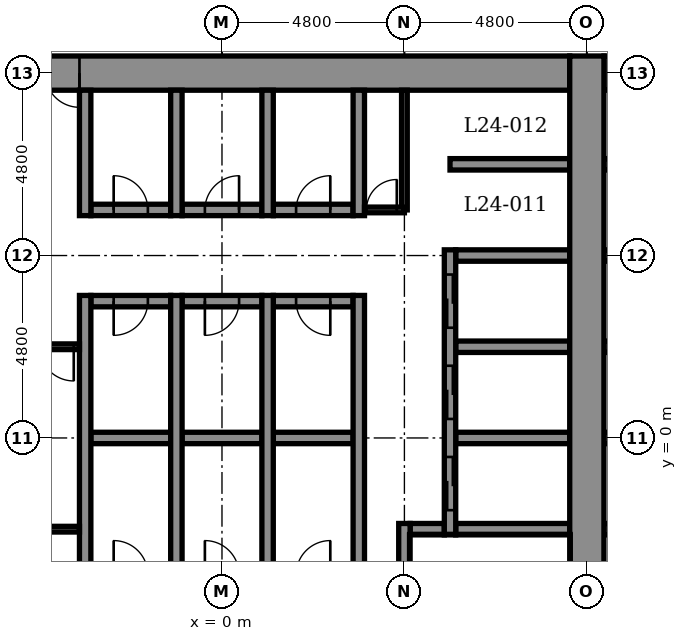
"""IFC4 building model, lengths in metres.
Left out: names, types, materials, properties, quantities, classifications, styles, units other than length and angle.
Written with IfcOpenShell. Run it as: python <this file> out.ifc"""

import sys

from ifc_helpers import new_model, si_unit, direction, frame, frame_2d, origin, place, context, subcontext, project, spatial, rectangle, extrude, element, fill, save


model = new_model("IFC4")
c1 = context("Model", 3, precision=1e-05, world=origin(), true_north=direction((0.0, 1.0)))
c2 = subcontext(c1, "Body", "Model", "MODEL_VIEW")
j1 = project(units=[si_unit("LENGTHUNIT", "METRE"), si_unit("PLANEANGLEUNIT", "RADIAN")], contexts=[c1])
p1 = place(None, origin())
s1 = spatial("IfcSite", under=j1, at=p1, CompositionType="ELEMENT")
p2 = place(p1, origin())
s2 = spatial("IfcBuilding", under=s1, at=p2, CompositionType="ELEMENT")
p3 = place(p2, frame((0.0, 0.0, 122.9)))
s3 = spatial("IfcBuildingStorey", under=s2, at=p3, CompositionType="ELEMENT", Elevation=122.9)
p4 = place(p3, frame((4.95, -2.4, -0.2), z_axis=(0.0, 0.0, 1.0), x_axis=(1.0, 0.0, 0.0)))
e1 = element("IfcWall", 1, at=p4, inside=s3, PredefinedType="STANDARD", context=c2, shape_type="SweptSolid", body=[
    extrude(rectangle(XDim=0.9, YDim=0.3, at=frame_2d((0.45, 0.0))), origin(), (0.0, 0.0, 1.0), 4.4),
])
p5 = place(p3, frame((6.15, -2.4, -0.2), z_axis=(0.0, 0.0, 1.0), x_axis=(1.0, 0.0, 0.0)))
e2 = element("IfcWall", 2, at=p5, inside=s3, PredefinedType="STANDARD", context=c2, shape_type="SweptSolid", body=[
    extrude(rectangle(XDim=3.0, YDim=0.3, at=frame_2d((1.5, 0.0))), origin(), (0.0, 0.0, 1.0), 4.4),
])
p6 = place(p3, frame((10.05, -2.4, -0.2), z_axis=(0.0, 0.0, 1.0), x_axis=(1.0, 0.0, 0.0)))
e3 = element("IfcWall", 3, at=p6, inside=s3, PredefinedType="STANDARD", context=c2, shape_type="SweptSolid", body=[
    extrude(rectangle(XDim=3.9, YDim=0.3, at=frame_2d((1.95, 0.0))), origin(), (0.0, 0.0, 1.0), 4.4),
])
p7 = place(p3, frame((-3.45, 0.0, -0.2), z_axis=(0.0, 0.0, 1.0), x_axis=(1.0, 0.0, 0.0)))
e4 = element("IfcWall", 4, at=p7, inside=s3, PredefinedType="STANDARD", context=c2, shape_type="SweptSolid", body=[
    extrude(rectangle(XDim=2.1, YDim=0.3, at=frame_2d((1.05, 0.0))), origin(), (0.0, 0.0, 1.0), 4.4),
])
p8 = place(p3, frame((-1.05, 0.0, -0.2), z_axis=(0.0, 0.0, 1.0), x_axis=(1.0, 0.0, 0.0)))
e5 = element("IfcWall", 5, at=p8, inside=s3, PredefinedType="STANDARD", context=c2, shape_type="SweptSolid", body=[
    extrude(rectangle(XDim=2.1, YDim=0.3, at=frame_2d((1.05, 0.0))), origin(), (0.0, 0.0, 1.0), 4.4),
])
p9 = place(p3, frame((1.35, 0.0, -0.2), z_axis=(0.0, 0.0, 1.0), x_axis=(1.0, 0.0, 0.0)))
e6 = element("IfcWall", 6, at=p9, inside=s3, PredefinedType="STANDARD", context=c2, shape_type="SweptSolid", body=[
    extrude(rectangle(XDim=2.1, YDim=0.3, at=frame_2d((1.05, 0.0))), origin(), (0.0, 0.0, 1.0), 4.4),
])
p10 = place(p3, frame((6.15, 0.0, -0.2), z_axis=(0.0, 0.0, 1.0), x_axis=(1.0, 0.0, 0.0)))
e7 = element("IfcWall", 7, at=p10, inside=s3, PredefinedType="STANDARD", context=c2, shape_type="SweptSolid", body=[
    extrude(rectangle(XDim=3.0, YDim=0.3, at=frame_2d((1.5, 0.0))), origin(), (0.0, 0.0, 1.0), 4.4),
])
p11 = place(p3, frame((10.05, 0.0, -0.2), z_axis=(0.0, 0.0, 1.0), x_axis=(1.0, 0.0, 0.0)))
e8 = element("IfcWall", 8, at=p11, inside=s3, PredefinedType="STANDARD", context=c2, shape_type="SweptSolid", body=[
    extrude(rectangle(XDim=3.9, YDim=0.3, at=frame_2d((1.95, 0.0))), origin(), (0.0, 0.0, 1.0), 4.4),
])
p12 = place(p3, frame((6.15, 2.4, -0.2), z_axis=(0.0, 0.0, 1.0), x_axis=(1.0, 0.0, 0.0)))
e9 = element("IfcWall", 9, at=p12, inside=s3, PredefinedType="STANDARD", context=c2, shape_type="SweptSolid", body=[
    extrude(rectangle(XDim=3.0, YDim=0.3, at=frame_2d((1.5, 0.0))), origin(), (0.0, 0.0, 1.0), 4.4),
])
p13 = place(p3, frame((10.05, 2.4, -0.2), z_axis=(0.0, 0.0, 1.0), x_axis=(1.0, 0.0, 0.0)))
e10 = element("IfcWall", 10, at=p13, inside=s3, PredefinedType="STANDARD", context=c2, shape_type="SweptSolid", body=[
    extrude(rectangle(XDim=3.9, YDim=0.3, at=frame_2d((1.95, 0.0))), origin(), (0.0, 0.0, 1.0), 4.4),
])
p14 = place(p3, frame((-3.45, 3.6, -0.2), z_axis=(0.0, 0.0, 1.0), x_axis=(1.0, 0.0, 0.0)))
e11 = element("IfcWall", 11, at=p14, inside=s3, PredefinedType="STANDARD", context=c2, shape_type="SweptSolid", body=[
    extrude(rectangle(XDim=2.1, YDim=0.3, at=frame_2d((1.05, 0.0))), origin(), (0.0, 0.0, 1.0), 4.4),
])
p15 = place(p14, frame((0.6, 0.0, 0.2)))
e12 = element("IfcOpeningElement", 12, at=p15, cuts=e11, PredefinedType="OPENING", context=c2, shape_type="SweptSolid", body=[
    extrude(rectangle(XDim=0.9, YDim=2.1, at=frame_2d((0.45, 1.05))), frame((0.0, 0.16, 0.0), z_axis=(0.0, -1.0, 0.0), x_axis=(1.0, 0.0, 0.0)), (0.0, 0.0, 1.0), 0.32),
])
p16 = place(p3, frame((-1.05, 3.6, -0.2), z_axis=(0.0, 0.0, 1.0), x_axis=(1.0, 0.0, 0.0)))
e13 = element("IfcWall", 13, at=p16, inside=s3, PredefinedType="STANDARD", context=c2, shape_type="SweptSolid", body=[
    extrude(rectangle(XDim=2.1, YDim=0.3, at=frame_2d((1.05, 0.0))), origin(), (0.0, 0.0, 1.0), 4.4),
])
p17 = place(p16, frame((0.6, 0.0, 0.2)))
e14 = element("IfcOpeningElement", 14, at=p17, cuts=e13, PredefinedType="OPENING", context=c2, shape_type="SweptSolid", body=[
    extrude(rectangle(XDim=0.9, YDim=2.1, at=frame_2d((0.45, 1.05))), frame((0.0, 0.16, 0.0), z_axis=(0.0, -1.0, 0.0), x_axis=(1.0, 0.0, 0.0)), (0.0, 0.0, 1.0), 0.32),
])
p18 = place(p3, frame((1.35, 3.6, -0.2), z_axis=(0.0, 0.0, 1.0), x_axis=(1.0, 0.0, 0.0)))
e15 = element("IfcWall", 15, at=p18, inside=s3, PredefinedType="STANDARD", context=c2, shape_type="SweptSolid", body=[
    extrude(rectangle(XDim=2.1, YDim=0.3, at=frame_2d((1.05, 0.0))), origin(), (0.0, 0.0, 1.0), 4.4),
])
p19 = place(p18, frame((0.6, 0.0, 0.2)))
e16 = element("IfcOpeningElement", 16, at=p19, cuts=e15, PredefinedType="OPENING", context=c2, shape_type="SweptSolid", body=[
    extrude(rectangle(XDim=0.9, YDim=2.1, at=frame_2d((0.45, 1.05))), frame((0.0, 0.16, 0.0), z_axis=(0.0, -1.0, 0.0), x_axis=(1.0, 0.0, 0.0)), (0.0, 0.0, 1.0), 0.32),
])
p20 = place(p3, frame((6.15, 4.8, -0.2), z_axis=(0.0, 0.0, 1.0), x_axis=(1.0, 0.0, 0.0)))
e17 = element("IfcWall", 17, at=p20, inside=s3, PredefinedType="STANDARD", context=c2, shape_type="SweptSolid", body=[
    extrude(rectangle(XDim=3.0, YDim=0.3, at=frame_2d((1.5, 0.0))), origin(), (0.0, 0.0, 1.0), 4.4),
])
p21 = place(p3, frame((10.05, 4.8, -0.2), z_axis=(0.0, 0.0, 1.0), x_axis=(1.0, 0.0, 0.0)))
e18 = element("IfcWall", 18, at=p21, inside=s3, PredefinedType="STANDARD", context=c2, shape_type="SweptSolid", body=[
    extrude(rectangle(XDim=3.9, YDim=0.3, at=frame_2d((1.95, 0.0))), origin(), (0.0, 0.0, 1.0), 4.4),
])
p22 = place(p3, frame((-3.45, 6.0, -0.2), z_axis=(0.0, 0.0, 1.0), x_axis=(1.0, 0.0, 0.0)))
e19 = element("IfcWall", 19, at=p22, inside=s3, PredefinedType="STANDARD", context=c2, shape_type="SweptSolid", body=[
    extrude(rectangle(XDim=2.1, YDim=0.3, at=frame_2d((1.05, 0.0))), origin(), (0.0, 0.0, 1.0), 4.4),
])
p23 = place(p22, frame((0.6, 0.0, 0.2)))
e20 = element("IfcOpeningElement", 20, at=p23, cuts=e19, PredefinedType="OPENING", context=c2, shape_type="SweptSolid", body=[
    extrude(rectangle(XDim=0.9, YDim=2.1, at=frame_2d((0.45, 1.05))), frame((0.0, 0.16, 0.0), z_axis=(0.0, -1.0, 0.0), x_axis=(1.0, 0.0, 0.0)), (0.0, 0.0, 1.0), 0.32),
])
p24 = place(p3, frame((-1.05, 6.0, -0.2), z_axis=(0.0, 0.0, 1.0), x_axis=(1.0, 0.0, 0.0)))
e21 = element("IfcWall", 21, at=p24, inside=s3, PredefinedType="STANDARD", context=c2, shape_type="SweptSolid", body=[
    extrude(rectangle(XDim=2.1, YDim=0.3, at=frame_2d((1.05, 0.0))), origin(), (0.0, 0.0, 1.0), 4.4),
])
p25 = place(p24, frame((0.6, 0.0, 0.2)))
e22 = element("IfcOpeningElement", 22, at=p25, cuts=e21, PredefinedType="OPENING", context=c2, shape_type="SweptSolid", body=[
    extrude(rectangle(XDim=0.9, YDim=2.1, at=frame_2d((0.45, 1.05))), frame((0.0, 0.16, 0.0), z_axis=(0.0, -1.0, 0.0), x_axis=(1.0, 0.0, 0.0)), (0.0, 0.0, 1.0), 0.32),
])
p26 = place(p3, frame((1.35, 6.0, -0.2), z_axis=(0.0, 0.0, 1.0), x_axis=(1.0, 0.0, 0.0)))
e23 = element("IfcWall", 23, at=p26, inside=s3, PredefinedType="STANDARD", context=c2, shape_type="SweptSolid", body=[
    extrude(rectangle(XDim=2.1, YDim=0.3, at=frame_2d((1.05, 0.0))), origin(), (0.0, 0.0, 1.0), 4.4),
])
p27 = place(p26, frame((0.6, 0.0, 0.2)))
e24 = element("IfcOpeningElement", 24, at=p27, cuts=e23, PredefinedType="OPENING", context=c2, shape_type="SweptSolid", body=[
    extrude(rectangle(XDim=0.9, YDim=2.1, at=frame_2d((0.45, 1.05))), frame((0.0, 0.16, 0.0), z_axis=(0.0, -1.0, 0.0), x_axis=(1.0, 0.0, 0.0)), (0.0, 0.0, 1.0), 0.32),
])
p28 = place(p3, frame((6.0, 7.2, -0.2), z_axis=(0.0, 0.0, 1.0), x_axis=(1.0, 0.0, 0.0)))
e25 = element("IfcWall", 25, at=p28, inside=s3, PredefinedType="STANDARD", context=c2, shape_type="SweptSolid", body=[
    extrude(rectangle(XDim=3.15, YDim=0.3, at=frame_2d((1.575, 0.0))), origin(), (0.0, 0.0, 1.0), 4.4),
])
p29 = place(p3, frame((10.05, 7.2, -0.2), z_axis=(0.0, 0.0, 1.0), x_axis=(1.0, 0.0, 0.0)))
e26 = element("IfcWall", 26, at=p29, inside=s3, PredefinedType="STANDARD", context=c2, shape_type="SweptSolid", body=[
    extrude(rectangle(XDim=3.9, YDim=0.3, at=frame_2d((1.95, 0.0))), origin(), (0.0, 0.0, 1.0), 4.4),
])
p30 = place(p3, frame((-5.25, 9.6, -0.2), z_axis=(0.0, 0.0, 1.0), x_axis=(1.0, 0.0, 0.0)))
e27 = element("IfcWall", 27, at=p30, inside=s3, PredefinedType="SHEAR", context=c2, shape_type="SweptSolid", body=[
    extrude(rectangle(XDim=14.4, YDim=0.9, at=frame_2d((7.2, 0.0))), origin(), (0.0, 0.0, 1.0), 4.4),
])
p31 = place(p30, frame((0.6, 0.0, 0.2)))
e28 = element("IfcOpeningElement", 28, at=p31, cuts=e27, PredefinedType="OPENING", context=c2, shape_type="SweptSolid", body=[
    extrude(rectangle(XDim=0.9, YDim=2.1, at=frame_2d((0.45, 1.05))), frame((0.0, 0.46, 0.0), z_axis=(0.0, -1.0, 0.0), x_axis=(1.0, 0.0, 0.0)), (0.0, 0.0, 1.0), 0.92),
])
p32 = place(p3, frame((10.05, 9.6, -0.2), z_axis=(0.0, 0.0, 1.0), x_axis=(1.0, 0.0, 0.0)))
e29 = element("IfcWall", 29, at=p32, inside=s3, PredefinedType="SHEAR", context=c2, shape_type="SweptSolid", body=[
    extrude(rectangle(XDim=3.9, YDim=0.9, at=frame_2d((1.95, 0.0))), origin(), (0.0, 0.0, 1.0), 4.4),
])
p33 = place(p32, frame((0.7, 0.0, 0.2)))
e30 = element("IfcOpeningElement", 30, at=p33, cuts=e29, PredefinedType="OPENING", context=c2, shape_type="SweptSolid", body=[
    extrude(rectangle(XDim=0.9, YDim=2.1, at=frame_2d((0.45, 1.05))), frame((0.0, 0.46, 0.0), z_axis=(0.0, -1.0, 0.0), x_axis=(1.0, 0.0, 0.0)), (0.0, 0.0, 1.0), 0.92),
])
p34 = place(p32, frame((2.95, 0.0, 0.2)))
e31 = element("IfcOpeningElement", 31, at=p34, cuts=e29, PredefinedType="OPENING", context=c2, shape_type="SweptSolid", body=[
    extrude(rectangle(XDim=0.9, YDim=2.1, at=frame_2d((0.45, 1.05))), frame((0.0, 0.46, 0.0), z_axis=(0.0, -1.0, 0.0), x_axis=(1.0, 0.0, 0.0)), (0.0, 0.0, 1.0), 0.92),
])
p35 = place(p3, frame((-3.6, -3.75, -0.2), z_axis=(0.0, 0.0, 1.0), x_axis=(0.0, 1.0, 0.0)))
e32 = element("IfcWall", 32, at=p35, inside=s3, PredefinedType="STANDARD", context=c2, shape_type="SweptSolid", body=[
    extrude(rectangle(XDim=7.5, YDim=0.3, at=frame_2d((3.75, 0.0))), origin(), (0.0, 0.0, 1.0), 4.4),
])
p36 = place(p3, frame((-3.6, 5.85, -0.2), z_axis=(0.0, 0.0, 1.0), x_axis=(0.0, 1.0, 0.0)))
e33 = element("IfcWall", 33, at=p36, inside=s3, PredefinedType="STANDARD", context=c2, shape_type="SweptSolid", body=[
    extrude(rectangle(XDim=3.3, YDim=0.3, at=frame_2d((1.65, 0.0))), origin(), (0.0, 0.0, 1.0), 4.4),
])
p37 = place(p3, frame((-1.2, -3.75, -0.2), z_axis=(0.0, 0.0, 1.0), x_axis=(0.0, 1.0, 0.0)))
e34 = element("IfcWall", 34, at=p37, inside=s3, PredefinedType="STANDARD", context=c2, shape_type="SweptSolid", body=[
    extrude(rectangle(XDim=7.5, YDim=0.3, at=frame_2d((3.75, 0.0))), origin(), (0.0, 0.0, 1.0), 4.4),
])
p38 = place(p3, frame((-1.2, 5.85, -0.2), z_axis=(0.0, 0.0, 1.0), x_axis=(0.0, 1.0, 0.0)))
e35 = element("IfcWall", 35, at=p38, inside=s3, PredefinedType="STANDARD", context=c2, shape_type="SweptSolid", body=[
    extrude(rectangle(XDim=3.3, YDim=0.3, at=frame_2d((1.65, 0.0))), origin(), (0.0, 0.0, 1.0), 4.4),
])
p39 = place(p3, frame((1.2, -3.75, -0.2), z_axis=(0.0, 0.0, 1.0), x_axis=(0.0, 1.0, 0.0)))
e36 = element("IfcWall", 36, at=p39, inside=s3, PredefinedType="STANDARD", context=c2, shape_type="SweptSolid", body=[
    extrude(rectangle(XDim=7.5, YDim=0.3, at=frame_2d((3.75, 0.0))), origin(), (0.0, 0.0, 1.0), 4.4),
])
p40 = place(p3, frame((1.2, 5.85, -0.2), z_axis=(0.0, 0.0, 1.0), x_axis=(0.0, 1.0, 0.0)))
e37 = element("IfcWall", 37, at=p40, inside=s3, PredefinedType="STANDARD", context=c2, shape_type="SweptSolid", body=[
    extrude(rectangle(XDim=3.3, YDim=0.3, at=frame_2d((1.65, 0.0))), origin(), (0.0, 0.0, 1.0), 4.4),
])
p41 = place(p3, frame((3.6, -3.75, -0.2), z_axis=(0.0, 0.0, 1.0), x_axis=(0.0, 1.0, 0.0)))
e38 = element("IfcWall", 38, at=p41, inside=s3, PredefinedType="STANDARD", context=c2, shape_type="SweptSolid", body=[
    extrude(rectangle(XDim=7.5, YDim=0.3, at=frame_2d((3.75, 0.0))), origin(), (0.0, 0.0, 1.0), 4.4),
])
p42 = place(p3, frame((3.6, 5.85, -0.2), z_axis=(0.0, 0.0, 1.0), x_axis=(0.0, 1.0, 0.0)))
e39 = element("IfcWall", 39, at=p42, inside=s3, PredefinedType="STANDARD", context=c2, shape_type="SweptSolid", body=[
    extrude(rectangle(XDim=3.3, YDim=0.3, at=frame_2d((1.65, 0.0))), origin(), (0.0, 0.0, 1.0), 4.4),
])
p43 = place(p3, frame((4.8, -9.15, -0.2), z_axis=(0.0, 0.0, 1.0), x_axis=(0.0, 1.0, 0.0)))
e40 = element("IfcWall", 40, at=p43, inside=s3, PredefinedType="STANDARD", context=c2, shape_type="SweptSolid", body=[
    extrude(rectangle(XDim=6.9, YDim=0.3, at=frame_2d((3.45, 0.0))), origin(), (0.0, 0.0, 1.0), 4.4),
])
p44 = place(p43, frame((3.7, 0.0, 0.2)))
e41 = element("IfcOpeningElement", 41, at=p44, cuts=e40, PredefinedType="OPENING", context=c2, shape_type="SweptSolid", body=[
    extrude(rectangle(XDim=1.2, YDim=2.1, at=frame_2d((0.6, 1.05))), frame((0.0, 0.16, 0.0), z_axis=(0.0, -1.0, 0.0), x_axis=(1.0, 0.0, 0.0)), (0.0, 0.0, 1.0), 0.32),
])
p45 = place(p3, frame((6.0, -2.55, -0.2), z_axis=(0.0, 0.0, 1.0), x_axis=(0.0, 1.0, 0.0)))
e42 = element("IfcWall", 42, at=p45, inside=s3, PredefinedType="STANDARD", context=c2, shape_type="SweptSolid", body=[
    extrude(rectangle(XDim=7.5, YDim=0.3, at=frame_2d((3.75, 0.0))), origin(), (0.0, 0.0, 1.0), 4.4),
])
p46 = place(p45, frame((0.65, 0.0, 0.2)))
e43 = element("IfcOpeningElement", 43, at=p46, cuts=e42, PredefinedType="OPENING", context=c2, shape_type="SweptSolid", body=[
    extrude(rectangle(XDim=1.4, YDim=2.1, at=frame_2d((0.7, 1.05))), frame((0.0, 0.16, 0.0), z_axis=(0.0, -1.0, 0.0), x_axis=(1.0, 0.0, 0.0)), (0.0, 0.0, 1.0), 0.32),
])
p47 = place(p45, frame((3.05, 0.0, 0.2)))
e44 = element("IfcOpeningElement", 44, at=p47, cuts=e42, PredefinedType="OPENING", context=c2, shape_type="SweptSolid", body=[
    extrude(rectangle(XDim=1.4, YDim=2.1, at=frame_2d((0.7, 1.05))), frame((0.0, 0.16, 0.0), z_axis=(0.0, -1.0, 0.0), x_axis=(1.0, 0.0, 0.0)), (0.0, 0.0, 1.0), 0.32),
])
p48 = place(p45, frame((5.45, 0.0, 0.2)))
e45 = element("IfcOpeningElement", 45, at=p48, cuts=e42, PredefinedType="OPENING", context=c2, shape_type="SweptSolid", body=[
    extrude(rectangle(XDim=1.4, YDim=2.1, at=frame_2d((0.7, 1.05))), frame((0.0, 0.16, 0.0), z_axis=(0.0, -1.0, 0.0), x_axis=(1.0, 0.0, 0.0)), (0.0, 0.0, 1.0), 0.32),
])
p49 = place(p3, frame((9.6, -10.15, -0.2), z_axis=(0.0, 0.0, 1.0), x_axis=(0.0, 1.0, 0.0)))
e46 = element("IfcWall", 46, at=p49, inside=s3, PredefinedType="SHEAR", context=c2, shape_type="SweptSolid", body=[
    extrude(rectangle(XDim=20.2, YDim=0.9, at=frame_2d((10.1, 0.0))), origin(), (0.0, 0.0, 1.0), 4.4),
])
p50 = place(p3, frame((4.8, 6.0, 0.0), z_axis=(0.0, 0.0, 1.0), x_axis=(0.0, 1.0, 0.0)))
e47 = element("IfcWall", 47, at=p50, inside=s3, PredefinedType="PARTITIONING", context=c2, shape_type="SweptSolid", body=[
    extrude(rectangle(XDim=3.15, YDim=0.15, at=frame_2d((1.575, 0.0))), origin(), (0.0, 0.0, 1.0), 4.2),
])
p51 = place(p3, frame((3.75, 6.0, 0.0), z_axis=(0.0, 0.0, 1.0), x_axis=(1.0, 0.0, 0.0)))
e48 = element("IfcWall", 48, at=p51, inside=s3, PredefinedType="PARTITIONING", context=c2, shape_type="SweptSolid", body=[
    extrude(rectangle(XDim=1.05, YDim=0.15, at=frame_2d((0.525, 0.0))), origin(), (0.0, 0.0, 1.0), 4.2),
])
p52 = place(p51, frame((0.05, 0.0, 0.0)))
e49 = element("IfcOpeningElement", 49, at=p52, cuts=e48, PredefinedType="OPENING", context=c2, shape_type="SweptSolid", body=[
    extrude(rectangle(XDim=0.8, YDim=2.1, at=frame_2d((0.4, 1.05))), frame((0.0, 0.085, 0.0), z_axis=(0.0, -1.0, 0.0), x_axis=(1.0, 0.0, 0.0)), (0.0, 0.0, 1.0), 0.17),
])
p53 = place(p3, frame((-4.95, 2.4, 0.0), z_axis=(0.0, 0.0, 1.0), x_axis=(1.0, 0.0, 0.0)))
e50 = element("IfcWall", 50, at=p53, inside=s3, PredefinedType="PARTITIONING", context=c2, shape_type="SweptSolid", body=[
    extrude(rectangle(XDim=1.2, YDim=0.15, at=frame_2d((0.6, 0.0))), origin(), (0.0, 0.0, 1.0), 4.2),
])
p54 = place(p53, frame((0.15, 0.0, 0.0)))
e51 = element("IfcOpeningElement", 51, at=p54, cuts=e50, PredefinedType="OPENING", context=c2, shape_type="SweptSolid", body=[
    extrude(rectangle(XDim=0.9, YDim=2.1, at=frame_2d((0.45, 1.05))), frame((0.0, 0.085, 0.0), z_axis=(0.0, -1.0, 0.0), x_axis=(1.0, 0.0, 0.0)), (0.0, 0.0, 1.0), 0.17),
])
p55 = place(p3, frame((-4.95, -2.4, 0.0), z_axis=(0.0, 0.0, 1.0), x_axis=(1.0, 0.0, 0.0)))
e52 = element("IfcWall", 52, at=p55, inside=s3, PredefinedType="PARTITIONING", context=c2, shape_type="SweptSolid", body=[
    extrude(rectangle(XDim=1.2, YDim=0.15, at=frame_2d((0.6, 0.0))), origin(), (0.0, 0.0, 1.0), 4.2),
])
p56 = place(p52, origin())
e53 = element("IfcDoor", 53, at=p56, inside=s3, OperationType="SINGLE_SWING_RIGHT", PredefinedType="DOOR", context=c2, shape_type="SweptSolid", body=[
    extrude(rectangle(XDim=0.8, YDim=2.1, at=frame_2d((0.4, 1.05))), frame((0.0, 0.025, 0.0), z_axis=(0.0, -1.0, 0.0), x_axis=(1.0, 0.0, 0.0)), (0.0, 0.0, 1.0), 0.05),
])
fill(e49, e53)
p57 = place(p46, origin())
e54 = element("IfcDoor", 54, at=p57, inside=s3, OperationType="DOUBLE_DOOR_SLIDING", PredefinedType="DOOR", context=c2, shape_type="SweptSolid", body=[
    extrude(rectangle(XDim=1.4, YDim=2.1, at=frame_2d((0.7, 1.05))), frame((0.0, 0.025, 0.0), z_axis=(0.0, -1.0, 0.0), x_axis=(1.0, 0.0, 0.0)), (0.0, 0.0, 1.0), 0.05),
])
fill(e43, e54)
p58 = place(p47, origin())
e55 = element("IfcDoor", 55, at=p58, inside=s3, OperationType="DOUBLE_DOOR_SLIDING", PredefinedType="DOOR", context=c2, shape_type="SweptSolid", body=[
    extrude(rectangle(XDim=1.4, YDim=2.1, at=frame_2d((0.7, 1.05))), frame((0.0, 0.025, 0.0), z_axis=(0.0, -1.0, 0.0), x_axis=(1.0, 0.0, 0.0)), (0.0, 0.0, 1.0), 0.05),
])
fill(e44, e55)
p59 = place(p48, origin())
e56 = element("IfcDoor", 56, at=p59, inside=s3, OperationType="DOUBLE_DOOR_SLIDING", PredefinedType="DOOR", context=c2, shape_type="SweptSolid", body=[
    extrude(rectangle(XDim=1.4, YDim=2.1, at=frame_2d((0.7, 1.05))), frame((0.0, 0.025, 0.0), z_axis=(0.0, -1.0, 0.0), x_axis=(1.0, 0.0, 0.0)), (0.0, 0.0, 1.0), 0.05),
])
fill(e45, e56)
p60 = place(p23, origin())
e57 = element("IfcDoor", 57, at=p60, inside=s3, OperationType="SINGLE_SWING_LEFT", PredefinedType="DOOR", context=c2, shape_type="SweptSolid", body=[
    extrude(rectangle(XDim=0.9, YDim=2.1, at=frame_2d((0.45, 1.05))), frame((0.0, 0.025, 0.0), z_axis=(0.0, -1.0, 0.0), x_axis=(1.0, 0.0, 0.0)), (0.0, 0.0, 1.0), 0.05),
])
fill(e20, e57)
p61 = place(p25, origin())
e58 = element("IfcDoor", 58, at=p61, inside=s3, OperationType="SINGLE_SWING_RIGHT", PredefinedType="DOOR", context=c2, shape_type="SweptSolid", body=[
    extrude(rectangle(XDim=0.9, YDim=2.1, at=frame_2d((0.45, 1.05))), frame((0.0, 0.025, 0.0), z_axis=(0.0, -1.0, 0.0), x_axis=(1.0, 0.0, 0.0)), (0.0, 0.0, 1.0), 0.05),
])
fill(e22, e58)
p62 = place(p27, origin())
e59 = element("IfcDoor", 59, at=p62, inside=s3, OperationType="SINGLE_SWING_RIGHT", PredefinedType="DOOR", context=c2, shape_type="SweptSolid", body=[
    extrude(rectangle(XDim=0.9, YDim=2.1, at=frame_2d((0.45, 1.05))), frame((0.0, 0.025, 0.0), z_axis=(0.0, -1.0, 0.0), x_axis=(1.0, 0.0, 0.0)), (0.0, 0.0, 1.0), 0.05),
])
fill(e24, e59)
p63 = place(p15, frame((0.9, 0.0, 0.0), z_axis=(0.0, 0.0, 1.0), x_axis=(-1.0, 0.0, 0.0)))
e60 = element("IfcDoor", 60, at=p63, inside=s3, OperationType="SINGLE_SWING_LEFT", PredefinedType="DOOR", context=c2, shape_type="SweptSolid", body=[
    extrude(rectangle(XDim=0.9, YDim=2.1, at=frame_2d((0.45, 1.05))), frame((0.0, 0.025, 0.0), z_axis=(0.0, -1.0, 0.0), x_axis=(1.0, 0.0, 0.0)), (0.0, 0.0, 1.0), 0.05),
])
fill(e12, e60)
p64 = place(p17, frame((0.9, 0.0, 0.0), z_axis=(0.0, 0.0, 1.0), x_axis=(-1.0, 0.0, 0.0)))
e61 = element("IfcDoor", 61, at=p64, inside=s3, OperationType="SINGLE_SWING_LEFT", PredefinedType="DOOR", context=c2, shape_type="SweptSolid", body=[
    extrude(rectangle(XDim=0.9, YDim=2.1, at=frame_2d((0.45, 1.05))), frame((0.0, 0.025, 0.0), z_axis=(0.0, -1.0, 0.0), x_axis=(1.0, 0.0, 0.0)), (0.0, 0.0, 1.0), 0.05),
])
fill(e14, e61)
p65 = place(p19, frame((0.9, 0.0, 0.0), z_axis=(0.0, 0.0, 1.0), x_axis=(-1.0, 0.0, 0.0)))
e62 = element("IfcDoor", 62, at=p65, inside=s3, OperationType="SINGLE_SWING_RIGHT", PredefinedType="DOOR", context=c2, shape_type="SweptSolid", body=[
    extrude(rectangle(XDim=0.9, YDim=2.1, at=frame_2d((0.45, 1.05))), frame((0.0, 0.025, 0.0), z_axis=(0.0, -1.0, 0.0), x_axis=(1.0, 0.0, 0.0)), (0.0, 0.0, 1.0), 0.05),
])
fill(e16, e62)
p66 = place(p31, frame((0.9, 0.0, 0.0), z_axis=(0.0, 0.0, 1.0), x_axis=(-1.0, 0.0, 0.0)))
e63 = element("IfcDoor", 63, at=p66, inside=s3, OperationType="SINGLE_SWING_RIGHT", PredefinedType="DOOR", context=c2, shape_type="SweptSolid", body=[
    extrude(rectangle(XDim=0.9, YDim=2.1, at=frame_2d((0.45, 1.05))), frame((0.0, 0.025, 0.0), z_axis=(0.0, -1.0, 0.0), x_axis=(1.0, 0.0, 0.0)), (0.0, 0.0, 1.0), 0.05),
])
fill(e28, e63)
p67 = place(p54, frame((0.9, 0.0, 0.0), z_axis=(0.0, 0.0, 1.0), x_axis=(-1.0, 0.0, 0.0)))
e64 = element("IfcDoor", 64, at=p67, inside=s3, OperationType="SINGLE_SWING_RIGHT", PredefinedType="DOOR", context=c2, shape_type="SweptSolid", body=[
    extrude(rectangle(XDim=0.9, YDim=2.1, at=frame_2d((0.45, 1.05))), frame((0.0, 0.025, 0.0), z_axis=(0.0, -1.0, 0.0), x_axis=(1.0, 0.0, 0.0)), (0.0, 0.0, 1.0), 0.05),
])
fill(e51, e64)
save(model, sys.argv[1])
